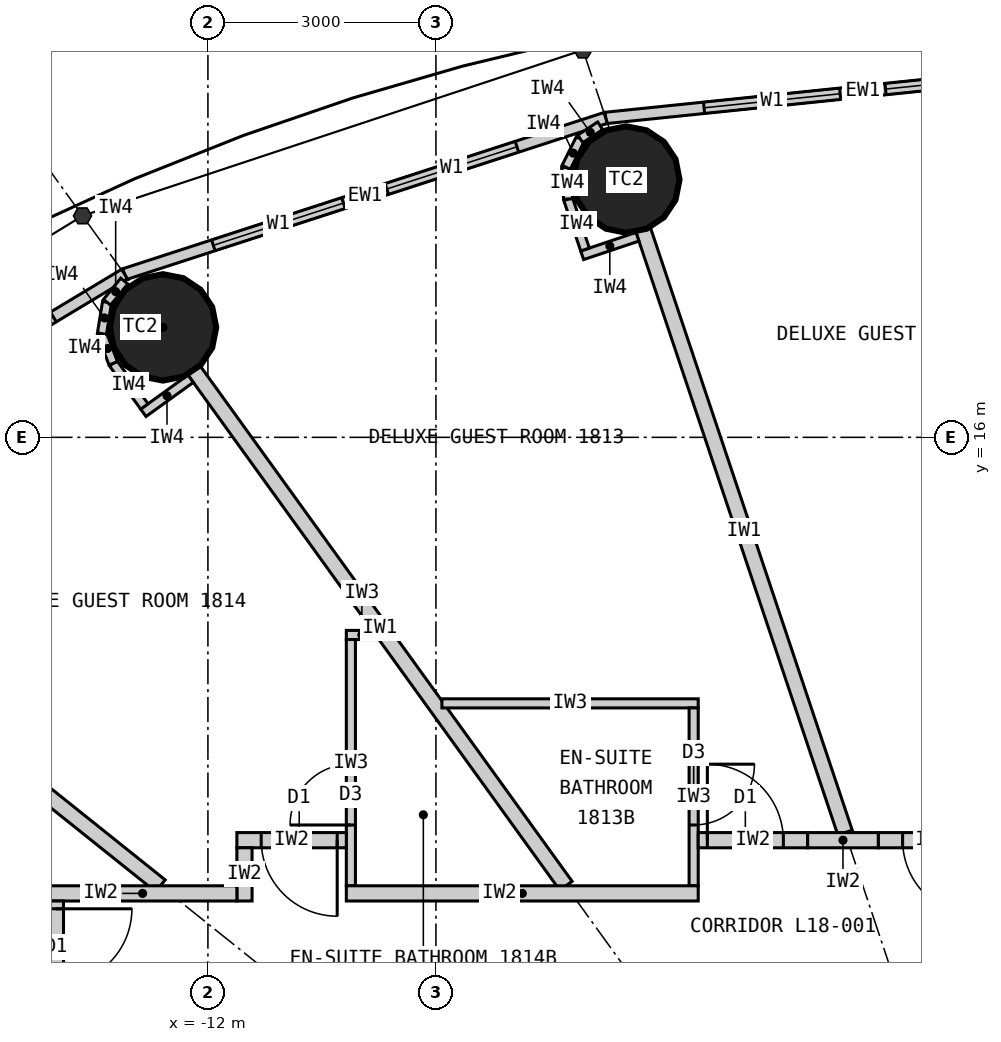
"""IFC4 building model, lengths in metres.
Left out: names, types, materials, properties, quantities, classifications, styles, units other than length and angle.
Written with IfcOpenShell. Run it as: python <this file> out.ifc"""

import sys

from ifc_helpers import new_model, si_unit, direction, frame, frame_2d, origin, origin_2d, place, context, subcontext, project, spatial, rectangle, circle, extrude, element, fill, save


model = new_model("IFC4")
c1 = context("Model", 3, precision=1e-05, world=origin(), true_north=direction((0.0, 1.0)))
c2 = subcontext(c1, "Body", "Model", "MODEL_VIEW")
j1 = project(units=[si_unit("LENGTHUNIT", "METRE"), si_unit("PLANEANGLEUNIT", "RADIAN")], contexts=[c1])
p1 = place(None, origin())
s1 = spatial("IfcSite", under=j1, at=p1, CompositionType="ELEMENT")
p2 = place(p1, origin())
s2 = spatial("IfcBuilding", under=s1, at=p2, CompositionType="ELEMENT")
p3 = place(p2, frame((0.0, 0.0, 73.8)))
s3 = spatial("IfcBuildingStorey", under=s2, at=p3, CompositionType="ELEMENT", Elevation=73.8)
for number, where, z_axis, x_axis in (
    (1, (-6.495, 19.391, 0.0), (0.0, 0.0, 1.0), (1.0, 0.0, 0.0)),
    (2, (-12.591, 17.447, 0.0), (0.0, 0.0, 1.0), (1.0, 0.0, 0.0)),
):
    element("IfcColumn", number, at=place(p3, frame(where, z_axis=z_axis, x_axis=x_axis)), inside=s3, PredefinedType="COLUMN", context=c2, shape_type="SweptSolid", body=[
        extrude(circle(Radius=0.7, at=origin_2d()), origin(), (0.0, 0.0, 1.0), 3.3),
    ])
p4 = place(p3, frame((0.0, 20.9, 0.0), z_axis=(0.0, 0.0, 1.0), x_axis=(-0.994721394369, -0.102612609291, 0.0)))
e3 = element("IfcWall", 3, at=p4, inside=s3, PredefinedType="ELEMENTEDWALL", context=c2, shape_type="SweptSolid", body=[
    extrude(rectangle(XDim=6.802, YDim=0.15, at=frame_2d((3.401, 0.0))), origin(), (0.0, 0.0, 1.0), 3.12),
])
p5 = place(p4, frame((1.301, 0.0, 0.9)))
e4 = element("IfcOpeningElement", 4, at=p5, cuts=e3, PredefinedType="OPENING", context=c2, shape_type="SweptSolid", body=[
    extrude(rectangle(XDim=1.8, YDim=1.9, at=frame_2d((0.9, 0.95))), frame((0.0, 0.085, 0.0), z_axis=(0.0, -1.0, 0.0), x_axis=(1.0, 0.0, 0.0)), (0.0, 0.0, 1.0), 0.17),
])
p6 = place(p4, frame((3.701, 0.0, 0.9)))
e5 = element("IfcOpeningElement", 5, at=p6, cuts=e3, PredefinedType="OPENING", context=c2, shape_type="SweptSolid", body=[
    extrude(rectangle(XDim=1.8, YDim=1.9, at=frame_2d((0.9, 0.95))), frame((0.0, 0.085, 0.0), z_axis=(0.0, -1.0, 0.0), x_axis=(1.0, 0.0, 0.0)), (0.0, 0.0, 1.0), 0.17),
])
p7 = place(p3, frame((-6.766, 20.202, 0.0), z_axis=(0.0, 0.0, 1.0), x_axis=(-0.951137534625, -0.308767534285, 0.0)))
e6 = element("IfcWall", 6, at=p7, inside=s3, PredefinedType="ELEMENTEDWALL", context=c2, shape_type="SweptSolid", body=[
    extrude(rectangle(XDim=6.655, YDim=0.15, at=frame_2d((3.328, 0.0))), origin(), (0.0, 0.0, 1.0), 3.12),
])
p8 = place(p7, frame((1.228, 0.0, 0.9)))
e7 = element("IfcOpeningElement", 7, at=p8, cuts=e6, PredefinedType="OPENING", context=c2, shape_type="SweptSolid", body=[
    extrude(rectangle(XDim=1.8, YDim=1.9, at=frame_2d((0.9, 0.95))), frame((0.0, 0.085, 0.0), z_axis=(0.0, -1.0, 0.0), x_axis=(1.0, 0.0, 0.0)), (0.0, 0.0, 1.0), 0.17),
])
p9 = place(p7, frame((3.628, 0.0, 0.9)))
e8 = element("IfcOpeningElement", 8, at=p9, cuts=e6, PredefinedType="OPENING", context=c2, shape_type="SweptSolid", body=[
    extrude(rectangle(XDim=1.8, YDim=1.9, at=frame_2d((0.9, 0.95))), frame((0.0, 0.085, 0.0), z_axis=(0.0, -1.0, 0.0), x_axis=(1.0, 0.0, 0.0)), (0.0, 0.0, 1.0), 0.17),
])
p10 = place(p3, frame((-13.096, 18.147, 0.0), z_axis=(0.0, 0.0, 1.0), x_axis=(-0.856983180864, -0.515344377787, 0.0)))
e9 = element("IfcWall", 9, at=p10, inside=s3, PredefinedType="ELEMENTEDWALL", context=c2, shape_type="SweptSolid", body=[
    extrude(rectangle(XDim=6.386, YDim=0.15, at=frame_2d((3.193, 0.0))), origin(), (0.0, 0.0, 1.0), 3.12),
])
p11 = place(p10, frame((1.093, 0.0, 0.9)))
e10 = element("IfcOpeningElement", 10, at=p11, cuts=e9, PredefinedType="OPENING", context=c2, shape_type="SweptSolid", body=[
    extrude(rectangle(XDim=1.8, YDim=1.9, at=frame_2d((0.9, 0.95))), frame((0.0, 0.085, 0.0), z_axis=(0.0, -1.0, 0.0), x_axis=(1.0, 0.0, 0.0)), (0.0, 0.0, 1.0), 0.17),
])
p12 = place(p10, frame((3.493, 0.0, 0.9)))
e11 = element("IfcOpeningElement", 11, at=p12, cuts=e9, PredefinedType="OPENING", context=c2, shape_type="SweptSolid", body=[
    extrude(rectangle(XDim=1.8, YDim=1.9, at=frame_2d((0.9, 0.95))), frame((0.0, 0.085, 0.0), z_axis=(0.0, -1.0, 0.0), x_axis=(1.0, 0.0, 0.0)), (0.0, 0.0, 1.0), 0.17),
])
p13 = place(p3, frame((-3.617, 10.8, 0.0), z_axis=(0.0, 0.0, 1.0), x_axis=(-0.317576599239, 0.948232621046, 0.0)))
e12 = element("IfcWall", 12, at=p13, inside=s3, PredefinedType="PARTITIONING", context=c2, shape_type="SweptSolid", body=[
    extrude(rectangle(XDim=8.36, YDim=0.2, at=frame_2d((4.18, 0.0))), origin(), (0.0, 0.0, 1.0), 2.32),
])
p14 = place(p3, frame((-7.289, 10.1, 0.0), z_axis=(0.0, 0.0, 1.0), x_axis=(-0.585198353053, 0.810890182197, 0.0)))
e13 = element("IfcWall", 13, at=p14, inside=s3, PredefinedType="PARTITIONING", context=c2, shape_type="SweptSolid", body=[
    extrude(rectangle(XDim=8.36, YDim=0.2, at=frame_2d((4.18, 0.0))), origin(), (0.0, 0.0, 1.0), 2.32),
])
p15 = place(p3, frame((-12.625, 10.1, 0.0), z_axis=(0.0, 0.0, 1.0), x_axis=(-0.780892451574, 0.624665493744, 0.0)))
e14 = element("IfcWall", 14, at=p15, inside=s3, PredefinedType="PARTITIONING", context=c2, shape_type="SweptSolid", body=[
    extrude(rectangle(XDim=6.045, YDim=0.2, at=frame_2d((3.022, 0.0))), origin(), (0.0, 0.0, 1.0), 2.32),
])
p16 = place(p3, frame((-8.921, 12.5, 0.0), z_axis=(0.0, 0.0, 1.0), x_axis=(1.0, 0.0, 0.0)))
e15 = element("IfcWall", 15, at=p16, inside=s3, PredefinedType="PARTITIONING", context=c2, shape_type="SweptSolid", body=[
    extrude(rectangle(XDim=3.372, YDim=0.12, at=frame_2d((1.686, 0.0))), origin(), (0.0, 0.0, 1.0), 3.12),
])
p17 = place(p3, frame((-5.609, 10.1, 0.0), z_axis=(0.0, 0.0, 1.0), x_axis=(0.0, 1.0, 0.0)))
e16 = element("IfcWall", 16, at=p17, inside=s3, PredefinedType="PARTITIONING", context=c2, shape_type="SweptSolid", body=[
    extrude(rectangle(XDim=2.34, YDim=0.12, at=frame_2d((1.17, 0.0))), origin(), (0.0, 0.0, 1.0), 3.12),
])
p18 = place(p17, frame((0.8, 0.0, 0.0)))
e17 = element("IfcOpeningElement", 17, at=p18, cuts=e16, PredefinedType="OPENING", context=c2, shape_type="SweptSolid", body=[
    extrude(rectangle(XDim=0.8, YDim=2.1, at=frame_2d((0.4, 1.05))), frame((0.0, 0.07, 0.0), z_axis=(0.0, -1.0, 0.0), x_axis=(1.0, 0.0, 0.0)), (0.0, 0.0, 1.0), 0.14),
])
p19 = place(p3, frame((-9.771, 13.4, 0.0), z_axis=(0.0, 0.0, 1.0), x_axis=(-1.0, 0.0, 0.0)))
e18 = element("IfcWall", 18, at=p19, inside=s3, PredefinedType="PARTITIONING", context=c2, shape_type="SweptSolid", body=[
    extrude(rectangle(XDim=0.408, YDim=0.12, at=frame_2d((0.204, 0.0))), origin(), (0.0, 0.0, 1.0), 3.12),
])
p20 = place(p3, frame((-10.119, 10.1, 0.0), z_axis=(0.0, 0.0, 1.0), x_axis=(0.0, 1.0, 0.0)))
e19 = element("IfcWall", 19, at=p20, inside=s3, PredefinedType="PARTITIONING", context=c2, shape_type="SweptSolid", body=[
    extrude(rectangle(XDim=3.24, YDim=0.12, at=frame_2d((1.62, 0.0))), origin(), (0.0, 0.0, 1.0), 3.12),
])
p21 = place(p20, frame((0.8, 0.0, 0.0)))
e20 = element("IfcOpeningElement", 20, at=p21, cuts=e19, PredefinedType="OPENING", context=c2, shape_type="SweptSolid", body=[
    extrude(rectangle(XDim=0.8, YDim=2.1, at=frame_2d((0.4, 1.05))), frame((0.0, 0.07, 0.0), z_axis=(0.0, -1.0, 0.0), x_axis=(1.0, 0.0, 0.0)), (0.0, 0.0, 1.0), 0.14),
])
p22 = place(p3, frame((-3.18, 10.7, 0.0), z_axis=(0.0, 0.0, 1.0), x_axis=(1.0, 0.0, 0.0)))
e21 = element("IfcWall", 21, at=p22, inside=s3, PredefinedType="PARTITIONING", context=c2, shape_type="SweptSolid", body=[
    extrude(rectangle(XDim=1.44, YDim=0.2, at=frame_2d((0.72, 0.0))), origin(), (0.0, 0.0, 1.0), 3.12),
])
p23 = place(p22, frame((0.32, 0.0, 0.0)))
e22 = element("IfcOpeningElement", 22, at=p23, cuts=e21, PredefinedType="OPENING", context=c2, shape_type="SweptSolid", body=[
    extrude(rectangle(XDim=1.0, YDim=2.2, at=frame_2d((0.5, 1.1))), frame((0.0, 0.11, 0.0), z_axis=(0.0, -1.0, 0.0), x_axis=(1.0, 0.0, 0.0)), (0.0, 0.0, 1.0), 0.22),
])
p24 = place(p3, frame((-5.549, 10.7, 0.0), z_axis=(0.0, 0.0, 1.0), x_axis=(1.0, 0.0, 0.0)))
e23 = element("IfcWall", 23, at=p24, inside=s3, PredefinedType="PARTITIONING", context=c2, shape_type="SweptSolid", body=[
    extrude(rectangle(XDim=1.44, YDim=0.2, at=frame_2d((0.72, 0.0))), origin(), (0.0, 0.0, 1.0), 3.12),
])
p25 = place(p24, frame((0.12, 0.0, 0.0)))
e24 = element("IfcOpeningElement", 24, at=p25, cuts=e23, PredefinedType="OPENING", context=c2, shape_type="SweptSolid", body=[
    extrude(rectangle(XDim=1.0, YDim=2.2, at=frame_2d((0.5, 1.1))), frame((0.0, 0.11, 0.0), z_axis=(0.0, -1.0, 0.0), x_axis=(1.0, 0.0, 0.0)), (0.0, 0.0, 1.0), 0.22),
])
p26 = place(p3, frame((-11.619, 10.7, 0.0), z_axis=(0.0, 0.0, 1.0), x_axis=(1.0, 0.0, 0.0)))
e25 = element("IfcWall", 25, at=p26, inside=s3, PredefinedType="PARTITIONING", context=c2, shape_type="SweptSolid", body=[
    extrude(rectangle(XDim=1.44, YDim=0.2, at=frame_2d((0.72, 0.0))), origin(), (0.0, 0.0, 1.0), 3.12),
])
p27 = place(p26, frame((0.32, 0.0, 0.0)))
e26 = element("IfcOpeningElement", 26, at=p27, cuts=e25, PredefinedType="OPENING", context=c2, shape_type="SweptSolid", body=[
    extrude(rectangle(XDim=1.0, YDim=2.2, at=frame_2d((0.5, 1.1))), frame((0.0, 0.11, 0.0), z_axis=(0.0, -1.0, 0.0), x_axis=(1.0, 0.0, 0.0)), (0.0, 0.0, 1.0), 0.22),
])
p28 = place(p3, frame((-11.519, 9.9, 0.0), z_axis=(0.0, 0.0, 1.0), x_axis=(0.0, 1.0, 0.0)))
e27 = element("IfcWall", 27, at=p28, inside=s3, PredefinedType="PARTITIONING", context=c2, shape_type="SweptSolid", body=[
    extrude(rectangle(XDim=0.7, YDim=0.2, at=frame_2d((0.35, 0.0))), origin(), (0.0, 0.0, 1.0), 3.12),
])
p29 = place(p3, frame((-4.109, 10.7, 0.0), z_axis=(0.0, 0.0, 1.0), x_axis=(1.0, 0.0, 0.0)))
e28 = element("IfcWall", 28, at=p29, inside=s3, PredefinedType="PARTITIONING", context=c2, shape_type="SweptSolid", body=[
    extrude(rectangle(XDim=0.929, YDim=0.2, at=frame_2d((0.465, 0.0))), origin(), (0.0, 0.0, 1.0), 3.12),
])
p30 = place(p3, frame((-14.1, 10.0, 0.0), z_axis=(0.0, 0.0, 1.0), x_axis=(1.0, 0.0, 0.0)))
e29 = element("IfcWall", 29, at=p30, inside=s3, PredefinedType="PARTITIONING", context=c2, shape_type="SweptSolid", body=[
    extrude(rectangle(XDim=2.481, YDim=0.2, at=frame_2d((1.24, 0.0))), origin(), (0.0, 0.0, 1.0), 3.12),
])
p31 = place(p3, frame((-10.179, 10.0, 0.0), z_axis=(0.0, 0.0, 1.0), x_axis=(1.0, 0.0, 0.0)))
e30 = element("IfcWall", 30, at=p31, inside=s3, PredefinedType="PARTITIONING", context=c2, shape_type="SweptSolid", body=[
    extrude(rectangle(XDim=4.63, YDim=0.2, at=frame_2d((2.315, 0.0))), origin(), (0.0, 0.0, 1.0), 3.12),
])
p32 = place(p3, frame((-14.0, 9.9, 0.0), z_axis=(0.0, 0.0, 1.0), x_axis=(0.0, -1.0, 0.0)))
e31 = element("IfcWall", 31, at=p32, inside=s3, PredefinedType="PARTITIONING", context=c2, shape_type="SweptSolid", body=[
    extrude(rectangle(XDim=5.127, YDim=0.2, at=frame_2d((2.564, 0.0))), origin(), (0.0, 0.0, 1.0), 3.12),
])
p33 = place(p32, frame((0.103, 0.0, 0.0)))
e32 = element("IfcOpeningElement", 32, at=p33, cuts=e31, PredefinedType="OPENING", context=c2, shape_type="SweptSolid", body=[
    extrude(rectangle(XDim=1.0, YDim=2.2, at=frame_2d((0.5, 1.1))), frame((0.0, 0.11, 0.0), z_axis=(0.0, -1.0, 0.0), x_axis=(1.0, 0.0, 0.0)), (0.0, 0.0, 1.0), 0.22),
])
p34 = place(p3, frame((-6.348, 18.639, 0.0), z_axis=(0.0, 0.0, 1.0), x_axis=(-0.948268951266, -0.317468102437, 0.0)))
e33 = element("IfcWall", 33, at=p34, inside=s3, PredefinedType="PARTITIONING", context=c2, shape_type="SweptSolid", body=[
    extrude(rectangle(XDim=0.768, YDim=0.12, at=frame_2d((0.384, 0.0))), origin(), (0.0, 0.0, 1.0), 3.12),
])
p35 = place(p3, frame((-7.038, 18.471, 0.0), z_axis=(0.0, 0.0, 1.0), x_axis=(-0.317378466199, 0.9482989556, 0.0)))
e34 = element("IfcWall", 34, at=p35, inside=s3, PredefinedType="PARTITIONING", context=c2, shape_type="SweptSolid", body=[
    extrude(rectangle(XDim=0.7, YDim=0.12, at=frame_2d((0.35, 0.0))), origin(), (0.0, 0.0, 1.0), 3.12),
])
p36 = place(p3, frame((-7.26, 19.135, 0.0), z_axis=(0.0, 0.0, 1.0), x_axis=(-0.0613238046, 0.99811792439, 0.0)))
e35 = element("IfcWall", 35, at=p36, inside=s3, PredefinedType="PARTITIONING", context=c2, shape_type="SweptSolid", body=[
    extrude(rectangle(XDim=0.418, YDim=0.12, at=frame_2d((0.209, 0.0))), origin(), (0.0, 0.0, 1.0), 3.12),
])
p37 = place(p3, frame((-7.286, 19.552, 0.0), z_axis=(0.0, 0.0, 1.0), x_axis=(0.445810757773, 0.89512723579, 0.0)))
e36 = element("IfcWall", 36, at=p37, inside=s3, PredefinedType="PARTITIONING", context=c2, shape_type="SweptSolid", body=[
    extrude(rectangle(XDim=0.418, YDim=0.12, at=frame_2d((0.209, 0.0))), origin(), (0.0, 0.0, 1.0), 3.12),
])
p38 = place(p3, frame((-7.1, 19.926, 0.0), z_axis=(0.0, 0.0, 1.0), x_axis=(0.833488262509, 0.552537162787, 0.0)))
e37 = element("IfcWall", 37, at=p38, inside=s3, PredefinedType="PARTITIONING", context=c2, shape_type="SweptSolid", body=[
    extrude(rectangle(XDim=0.313, YDim=0.12, at=frame_2d((0.156, 0.0))), origin(), (0.0, 0.0, 1.0), 3.12),
])
p39 = place(p3, frame((-12.227, 16.772, 0.0), z_axis=(0.0, 0.0, 1.0), x_axis=(-0.810821798253, -0.585293098778, 0.0)))
e38 = element("IfcWall", 38, at=p39, inside=s3, PredefinedType="PARTITIONING", context=c2, shape_type="SweptSolid", body=[
    extrude(rectangle(XDim=0.768, YDim=0.12, at=frame_2d((0.384, 0.0))), origin(), (0.0, 0.0, 1.0), 3.12),
])
p40 = place(p3, frame((-12.836, 16.406, 0.0), z_axis=(0.0, 0.0, 1.0), x_axis=(-0.585223113993, 0.810872312296, 0.0)))
e39 = element("IfcWall", 39, at=p40, inside=s3, PredefinedType="PARTITIONING", context=c2, shape_type="SweptSolid", body=[
    extrude(rectangle(XDim=0.7, YDim=0.12, at=frame_2d((0.35, 0.0))), origin(), (0.0, 0.0, 1.0), 3.12),
])
p41 = place(p3, frame((-13.246, 16.974, 0.0), z_axis=(0.0, 0.0, 1.0), x_axis=(-0.355728122235, 0.934589483705, 0.0)))
e40 = element("IfcWall", 40, at=p41, inside=s3, PredefinedType="PARTITIONING", context=c2, shape_type="SweptSolid", body=[
    extrude(rectangle(XDim=0.418, YDim=0.12, at=frame_2d((0.209, 0.0))), origin(), (0.0, 0.0, 1.0), 3.12),
])
p42 = place(p3, frame((-13.394, 17.365, 0.0), z_axis=(0.0, 0.0, 1.0), x_axis=(0.159379276926, 0.987217425943, 0.0)))
e41 = element("IfcWall", 41, at=p42, inside=s3, PredefinedType="PARTITIONING", context=c2, shape_type="SweptSolid", body=[
    extrude(rectangle(XDim=0.418, YDim=0.12, at=frame_2d((0.209, 0.0))), origin(), (0.0, 0.0, 1.0), 3.12),
])
p43 = place(p3, frame((-13.328, 17.777, 0.0), z_axis=(0.0, 0.0, 1.0), x_axis=(0.632276783541, 0.774742582407, 0.0)))
e42 = element("IfcWall", 42, at=p43, inside=s3, PredefinedType="PARTITIONING", context=c2, shape_type="SweptSolid", body=[
    extrude(rectangle(XDim=0.36, YDim=0.12, at=frame_2d((0.18, 0.0))), origin(), (0.0, 0.0, 1.0), 3.12),
])
p44 = place(p5, origin())
e43 = element("IfcWindow", 43, at=p44, inside=s3, PartitioningType="SINGLE_PANEL", PredefinedType="WINDOW", context=c2, shape_type="SweptSolid", body=[
    extrude(rectangle(XDim=1.8, YDim=1.9, at=frame_2d((0.9, 0.95))), frame((0.0, 0.03, 0.0), z_axis=(0.0, -1.0, 0.0), x_axis=(1.0, 0.0, 0.0)), (0.0, 0.0, 1.0), 0.06),
])
fill(e4, e43)
p45 = place(p6, origin())
e44 = element("IfcWindow", 44, at=p45, inside=s3, PartitioningType="SINGLE_PANEL", PredefinedType="WINDOW", context=c2, shape_type="SweptSolid", body=[
    extrude(rectangle(XDim=1.8, YDim=1.9, at=frame_2d((0.9, 0.95))), frame((0.0, 0.03, 0.0), z_axis=(0.0, -1.0, 0.0), x_axis=(1.0, 0.0, 0.0)), (0.0, 0.0, 1.0), 0.06),
])
fill(e5, e44)
p46 = place(p8, origin())
e45 = element("IfcWindow", 45, at=p46, inside=s3, PartitioningType="SINGLE_PANEL", PredefinedType="WINDOW", context=c2, shape_type="SweptSolid", body=[
    extrude(rectangle(XDim=1.8, YDim=1.9, at=frame_2d((0.9, 0.95))), frame((0.0, 0.03, 0.0), z_axis=(0.0, -1.0, 0.0), x_axis=(1.0, 0.0, 0.0)), (0.0, 0.0, 1.0), 0.06),
])
fill(e7, e45)
p47 = place(p9, origin())
e46 = element("IfcWindow", 46, at=p47, inside=s3, PartitioningType="SINGLE_PANEL", PredefinedType="WINDOW", context=c2, shape_type="SweptSolid", body=[
    extrude(rectangle(XDim=1.8, YDim=1.9, at=frame_2d((0.9, 0.95))), frame((0.0, 0.03, 0.0), z_axis=(0.0, -1.0, 0.0), x_axis=(1.0, 0.0, 0.0)), (0.0, 0.0, 1.0), 0.06),
])
fill(e8, e46)
p48 = place(p11, origin())
e47 = element("IfcWindow", 47, at=p48, inside=s3, PartitioningType="SINGLE_PANEL", PredefinedType="WINDOW", context=c2, shape_type="SweptSolid", body=[
    extrude(rectangle(XDim=1.8, YDim=1.9, at=frame_2d((0.9, 0.95))), frame((0.0, 0.03, 0.0), z_axis=(0.0, -1.0, 0.0), x_axis=(1.0, 0.0, 0.0)), (0.0, 0.0, 1.0), 0.06),
])
fill(e10, e47)
p49 = place(p23, origin())
e48 = element("IfcDoor", 48, at=p49, inside=s3, OperationType="SINGLE_SWING_RIGHT", PredefinedType="DOOR", context=c2, shape_type="SweptSolid", body=[
    extrude(rectangle(XDim=1.0, YDim=2.2, at=frame_2d((0.5, 1.1))), frame((0.0, 0.025, 0.0), z_axis=(0.0, -1.0, 0.0), x_axis=(1.0, 0.0, 0.0)), (0.0, 0.0, 1.0), 0.05),
])
fill(e22, e48)
p50 = place(p18, origin())
e49 = element("IfcDoor", 49, at=p50, inside=s3, OperationType="SINGLE_SWING_RIGHT", PredefinedType="DOOR", context=c2, shape_type="SweptSolid", body=[
    extrude(rectangle(XDim=0.8, YDim=2.1, at=frame_2d((0.4, 1.05))), frame((0.0, 0.025, 0.0), z_axis=(0.0, -1.0, 0.0), x_axis=(1.0, 0.0, 0.0)), (0.0, 0.0, 1.0), 0.05),
])
fill(e17, e49)
p51 = place(p25, origin())
e50 = element("IfcDoor", 50, at=p51, inside=s3, OperationType="SINGLE_SWING_LEFT", PredefinedType="DOOR", context=c2, shape_type="SweptSolid", body=[
    extrude(rectangle(XDim=1.0, YDim=2.2, at=frame_2d((0.5, 1.1))), frame((0.0, 0.025, 0.0), z_axis=(0.0, -1.0, 0.0), x_axis=(1.0, 0.0, 0.0)), (0.0, 0.0, 1.0), 0.05),
])
fill(e24, e50)
p52 = place(p21, origin())
e51 = element("IfcDoor", 51, at=p52, inside=s3, OperationType="SINGLE_SWING_LEFT", PredefinedType="DOOR", context=c2, shape_type="SweptSolid", body=[
    extrude(rectangle(XDim=0.8, YDim=2.1, at=frame_2d((0.4, 1.05))), frame((0.0, 0.025, 0.0), z_axis=(0.0, -1.0, 0.0), x_axis=(1.0, 0.0, 0.0)), (0.0, 0.0, 1.0), 0.05),
])
fill(e20, e51)
p53 = place(p27, origin())
e52 = element("IfcDoor", 52, at=p53, inside=s3, OperationType="SINGLE_SWING_RIGHT", PredefinedType="DOOR", context=c2, shape_type="SweptSolid", body=[
    extrude(rectangle(XDim=1.0, YDim=2.2, at=frame_2d((0.5, 1.1))), frame((0.0, 0.025, 0.0), z_axis=(0.0, -1.0, 0.0), x_axis=(1.0, 0.0, 0.0)), (0.0, 0.0, 1.0), 0.05),
])
fill(e26, e52)
p54 = place(p33, origin())
e53 = element("IfcDoor", 53, at=p54, inside=s3, OperationType="SINGLE_SWING_LEFT", PredefinedType="DOOR", context=c2, shape_type="SweptSolid", body=[
    extrude(rectangle(XDim=1.0, YDim=2.2, at=frame_2d((0.5, 1.1))), frame((0.0, 0.025, 0.0), z_axis=(0.0, -1.0, 0.0), x_axis=(1.0, 0.0, 0.0)), (0.0, 0.0, 1.0), 0.05),
])
fill(e32, e53)
save(model, sys.argv[1])
